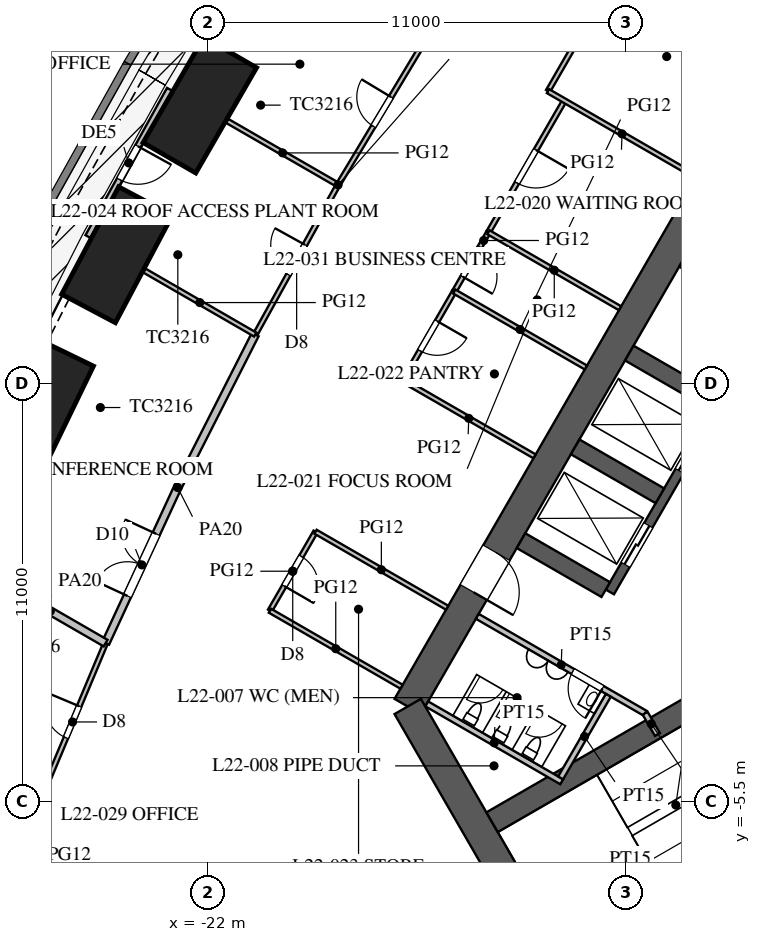
"""IFC4 building model, lengths in metres.
Left out: names, types, materials, properties, quantities, classifications, styles, units other than length and angle.
Written with IfcOpenShell. Run it as: python <this file> out.ifc"""

import sys

from ifc_helpers import new_model, si_unit, direction, frame, frame_2d, origin, origin_2d, place, context, subcontext, project, spatial, rectangle, extrude, element, fill, save


model = new_model("IFC4")
c1 = context("Model", 3, precision=1e-05, world=origin(), true_north=direction((0.0, 1.0)))
c2 = subcontext(c1, "Body", "Model", "MODEL_VIEW")
j1 = project(units=[si_unit("LENGTHUNIT", "METRE"), si_unit("PLANEANGLEUNIT", "RADIAN")], contexts=[c1])
p1 = place(None, origin())
s1 = spatial("IfcSite", under=j1, at=p1, CompositionType="ELEMENT")
p2 = place(p1, origin())
s2 = spatial("IfcBuilding", under=s1, at=p2, CompositionType="ELEMENT")
p3 = place(p2, frame((0.0, 0.0, 98.1)))
s3 = spatial("IfcBuildingStorey", under=s2, at=p3, CompositionType="ELEMENT", Elevation=98.1)
for number, where, z_axis, x_axis in (
    (1, (-22.213, 12.825, 0.0), (0.0, 0.0, 1.0), (-0.5, -0.866, 0.0)),
    (2, (-24.393, 8.887, 0.0), (0.0, 0.0, 1.0), (-0.468, -0.883, 0.0)),
    (3, (-26.43, 4.867, 0.0), (0.0, 0.0, 1.0), (-0.436, -0.9, 0.0)),
):
    element("IfcColumn", number, at=place(p3, frame(where, z_axis=z_axis, x_axis=x_axis)), inside=s3, PredefinedType="COLUMN", context=c2, shape_type="SweptSolid", body=[
        extrude(rectangle(XDim=3.2, YDim=1.6, at=origin_2d()), origin(), (0.0, 0.0, 1.0), 5.0),
    ])
p4 = place(p3, frame((-5.773, 16.0, 0.0), z_axis=(0.0, 0.0, 1.0), x_axis=(-0.500002442456, -0.866023993627, 0.0)))
e4 = element("IfcWall", 4, at=p4, inside=s3, PredefinedType="SHEAR", context=c2, shape_type="SweptSolid", body=[
    extrude(rectangle(XDim=21.939, YDim=0.8, at=frame_2d((10.97, 0.0))), origin(), (0.0, 0.0, 1.0), 5.0),
])
p5 = place(p4, frame((17.27, 0.0, 0.0)))
e5 = element("IfcOpeningElement", 5, at=p5, cuts=e4, PredefinedType="OPENING", context=c2, shape_type="SweptSolid", body=[
    extrude(rectangle(XDim=1.2, YDim=2.1, at=frame_2d((0.6, 1.05))), frame((0.0, 0.41, 0.0), z_axis=(0.0, -1.0, 0.0), x_axis=(1.0, 0.0, 0.0)), (0.0, 0.0, 1.0), 0.82),
])
p6 = place(p4, frame((3.47, 0.0, 0.0)))
e6 = element("IfcOpeningElement", 6, at=p6, cuts=e4, PredefinedType="OPENING", context=c2, shape_type="SweptSolid", body=[
    extrude(rectangle(XDim=1.2, YDim=2.1, at=frame_2d((0.6, 1.05))), frame((0.0, 0.41, 0.0), z_axis=(0.0, -1.0, 0.0), x_axis=(1.0, 0.0, 0.0)), (0.0, 0.0, 1.0), 0.82),
])
p7 = place(p3, frame((-16.743, -3.0, 0.0), z_axis=(0.0, 0.0, 1.0), x_axis=(0.499995765644, -0.866027848477, 0.0)))
e7 = element("IfcWall", 7, at=p7, inside=s3, PredefinedType="SHEAR", context=c2, shape_type="SweptSolid", body=[
    extrude(rectangle(XDim=11.547, YDim=0.8, at=frame_2d((5.773, 0.0))), origin(), (0.0, 0.0, 1.0), 5.0),
])
p8 = place(p3, frame((-5.724, 9.886, 0.0), z_axis=(0.0, 0.0, 1.0), x_axis=(-0.500001763848, -0.866024385424, 0.0)))
e8 = element("IfcWall", 8, at=p8, inside=s3, PredefinedType="SHEAR", context=c2, shape_type="SweptSolid", body=[
    extrude(rectangle(XDim=11.4, YDim=0.25, at=frame_2d((5.7, 0.0))), origin(), (0.0, 0.0, 1.0), 5.0),
])
p9 = place(p8, frame((6.525, 0.0, 0.0)))
e9 = element("IfcOpeningElement", 9, at=p9, cuts=e8, PredefinedType="OPENING", context=c2, shape_type="SweptSolid", body=[
    extrude(rectangle(XDim=1.2, YDim=2.2, at=frame_2d((0.6, 1.1))), frame((0.0, 0.135, 0.0), z_axis=(0.0, -1.0, 0.0), x_axis=(1.0, 0.0, 0.0)), (0.0, 0.0, 1.0), 0.27),
])
p10 = place(p8, frame((9.375, 0.0, 0.0)))
e10 = element("IfcOpeningElement", 10, at=p10, cuts=e8, PredefinedType="OPENING", context=c2, shape_type="SweptSolid", body=[
    extrude(rectangle(XDim=1.2, YDim=2.2, at=frame_2d((0.6, 1.1))), frame((0.0, 0.135, 0.0), z_axis=(0.0, -1.0, 0.0), x_axis=(1.0, 0.0, 0.0)), (0.0, 0.0, 1.0), 0.27),
])
for number, where, z_axis, x_axis in (
    (11, (-7.257, 7.481, 0.0), (0.0, 0.0, 1.0), (-0.866, 0.5, 0.0)),
    (12, (-8.682, 5.012, 0.0), (0.0, 0.0, 1.0), (-0.866, 0.5, 0.0)),
    (13, (-10.107, 2.544, 0.0), (0.0, 0.0, 1.0), (-0.866, 0.5, 0.0)),
    (14, (-11.532, 0.076, 0.0), (0.0, 0.0, 1.0), (-0.866, 0.5, 0.0)),
):
    element("IfcWall", number, at=place(p3, frame(where, z_axis=z_axis, x_axis=x_axis)), inside=s3, PredefinedType="SHEAR", context=c2, shape_type="SweptSolid", body=[
        extrude(rectangle(XDim=2.575, YDim=0.45, at=frame_2d((1.288, 0.0))), origin(), (0.0, 0.0, 1.0), 5.0),
    ])
for number, where, z_axis, x_axis in (
    (15, (-6.663, -1.509, 0.0), (0.0, 0.0, 1.0), (-0.866, -0.5, 0.0)),
    (16, (-4.638, -5.016, 0.0), (0.0, 0.0, 1.0), (-0.866, -0.5, 0.0)),
):
    element("IfcWall", number, at=place(p3, frame(where, z_axis=z_axis, x_axis=x_axis)), inside=s3, PredefinedType="SHEAR", context=c2, shape_type="SweptSolid", body=[
        extrude(rectangle(XDim=9.075, YDim=0.6, at=frame_2d((4.538, 0.0))), origin(), (0.0, 0.0, 1.0), 5.0),
    ])
p11 = place(p3, frame((-21.616, 17.676, 0.0), z_axis=(0.0, 0.0, 1.0), x_axis=(-0.51252396108, -0.858672923364, 0.0)))
e17 = element("IfcWall", 17, at=p11, inside=s3, PredefinedType="PARAPET", context=c2, shape_type="SweptSolid", body=[
    extrude(rectangle(XDim=4.5, YDim=0.25, at=frame_2d((2.25, 0.0))), origin(), (0.0, 0.0, 1.0), 1.1),
])
p12 = place(p3, frame((-23.923, 13.812, 0.0), z_axis=(0.0, 0.0, 1.0), x_axis=(-0.487373854787, -0.873193406795, 0.0)))
e18 = element("IfcWall", 18, at=p12, inside=s3, PredefinedType="PARAPET", context=c2, shape_type="SweptSolid", body=[
    extrude(rectangle(XDim=4.5, YDim=0.25, at=frame_2d((2.25, 0.0))), origin(), (0.0, 0.0, 1.0), 1.1),
])
p13 = place(p3, frame((-26.116, 9.882, 0.0), z_axis=(0.0, 0.0, 1.0), x_axis=(-0.461852697957, -0.886956642339, 0.0)))
e19 = element("IfcWall", 19, at=p13, inside=s3, PredefinedType="PARAPET", context=c2, shape_type="SweptSolid", body=[
    extrude(rectangle(XDim=4.504, YDim=0.25, at=frame_2d((2.252, 0.0))), origin(), (0.0, 0.0, 1.0), 1.1),
])
p14 = place(p3, frame((-23.01, 13.243, 0.0), z_axis=(0.0, 0.0, 1.0), x_axis=(-0.48433245205, -0.874884035682, 0.0)))
e20 = element("IfcWall", 20, at=p14, inside=s3, PredefinedType="SOLIDWALL", context=c2, shape_type="SweptSolid", body=[
    extrude(rectangle(XDim=4.431, YDim=0.15, at=frame_2d((2.215, 0.0))), origin(), (0.0, 0.0, 1.0), 4.98),
])
p15 = place(p14, frame((1.715, 0.0, 0.0)))
e21 = element("IfcOpeningElement", 21, at=p15, cuts=e20, PredefinedType="OPENING", context=c2, shape_type="SweptSolid", body=[
    extrude(rectangle(XDim=1.0, YDim=2.1, at=frame_2d((0.5, 1.05))), frame((0.0, 0.085, 0.0), z_axis=(0.0, -1.0, 0.0), x_axis=(1.0, 0.0, 0.0)), (0.0, 0.0, 1.0), 0.17),
])
p16 = place(p3, frame((-10.495, -3.178, 0.0), z_axis=(0.0, 0.0, 1.0), x_axis=(-0.86602216432, 0.500005610874, 0.0)))
e22 = element("IfcWall", 22, at=p16, inside=s3, PredefinedType="PARTITIONING", context=c2, shape_type="SweptSolid", body=[
    extrude(rectangle(XDim=5.1, YDim=0.15, at=frame_2d((2.55, 0.0))), origin(), (0.0, 0.0, 1.0), 4.8),
])
p17 = place(p16, frame((1.3, 0.0, 0.0)))
e23 = element("IfcOpeningElement", 23, at=p17, cuts=e22, PredefinedType="OPENING", context=c2, shape_type="SweptSolid", body=[
    extrude(rectangle(XDim=0.9, YDim=2.1, at=frame_2d((0.45, 1.05))), frame((0.0, 0.085, 0.0), z_axis=(0.0, -1.0, 0.0), x_axis=(1.0, 0.0, 0.0)), (0.0, 0.0, 1.0), 0.17),
])
p18 = place(p3, frame((-10.495, -3.178, 0.0), z_axis=(0.0, 0.0, 1.0), x_axis=(0.499842556608, -0.866116284689, 0.0)))
e24 = element("IfcWall", 24, at=p18, inside=s3, PredefinedType="PARTITIONING", context=c2, shape_type="SweptSolid", body=[
    extrude(rectangle(XDim=0.645, YDim=0.15, at=frame_2d((0.323, 0.0))), origin(), (0.0, 0.0, 1.0), 4.8),
])
p19 = place(p3, frame((-12.691, -4.982, 0.0), z_axis=(0.0, 0.0, 1.0), x_axis=(-0.8660249478, 0.500000789788, 0.0)))
e25 = element("IfcWall", 25, at=p19, inside=s3, PredefinedType="PARTITIONING", context=c2, shape_type="SweptSolid", body=[
    extrude(rectangle(XDim=4.1, YDim=0.15, at=frame_2d((2.05, 0.0))), origin(), (0.0, 0.0, 1.0), 4.8),
])
p20 = place(p3, frame((-11.464, -2.706, 0.0), z_axis=(0.0, 0.0, 1.0), x_axis=(-0.50001992892, -0.866013897511, 0.0)))
e26 = element("IfcWall", 26, at=p20, inside=s3, PredefinedType="PARTITIONING", context=c2, shape_type="SweptSolid", body=[
    extrude(rectangle(XDim=2.51, YDim=0.15, at=frame_2d((1.255, 0.0))), origin(), (0.0, 0.0, 1.0), 4.8),
])
p21 = place(p3, frame((-15.519, 7.921, 0.0), z_axis=(0.0, 0.0, 1.0), x_axis=(-0.50000943426, -0.866019956843, 0.0)))
e27 = element("IfcWall", 27, at=p21, inside=s3, PredefinedType="PARTITIONING", context=c2, shape_type="SweptSolid", body=[
    extrude(rectangle(XDim=2.7, YDim=0.12, at=frame_2d((1.35, 0.0))), origin(), (0.0, 0.0, 1.0), 3.6),
])
p22 = place(p21, frame((0.9, 0.0, 0.0)))
e28 = element("IfcOpeningElement", 28, at=p22, cuts=e27, PredefinedType="OPENING", context=c2, shape_type="SweptSolid", body=[
    extrude(rectangle(XDim=0.9, YDim=2.1, at=frame_2d((0.45, 1.05))), frame((0.0, 0.07, 0.0), z_axis=(0.0, -1.0, 0.0), x_axis=(1.0, 0.0, 0.0)), (0.0, 0.0, 1.0), 0.14),
])
p23 = place(p3, frame((-19.169, 1.599, 0.0), z_axis=(0.0, 0.0, 1.0), x_axis=(-0.499957262057, -0.866050077142, 0.0)))
e29 = element("IfcWall", 29, at=p23, inside=s3, PredefinedType="PARTITIONING", context=c2, shape_type="SweptSolid", body=[
    extrude(rectangle(XDim=2.4, YDim=0.12, at=frame_2d((1.2, 0.0))), origin(), (0.0, 0.0, 1.0), 3.6),
])
p24 = place(p23, frame((0.75, 0.0, 0.0)))
e30 = element("IfcOpeningElement", 30, at=p24, cuts=e29, PredefinedType="OPENING", context=c2, shape_type="SweptSolid", body=[
    extrude(rectangle(XDim=0.9, YDim=2.1, at=frame_2d((0.45, 1.05))), frame((0.0, 0.07, 0.0), z_axis=(0.0, -1.0, 0.0), x_axis=(1.0, 0.0, 0.0)), (0.0, 0.0, 1.0), 0.14),
])
p25 = place(p3, frame((-14.619, 9.479, 0.0), z_axis=(0.0, 0.0, 1.0), x_axis=(-0.499961193289, -0.866047807691, 0.0)))
e31 = element("IfcWall", 31, at=p25, inside=s3, PredefinedType="PARTITIONING", context=c2, shape_type="SweptSolid", body=[
    extrude(rectangle(XDim=1.8, YDim=0.12, at=frame_2d((0.9, 0.0))), origin(), (0.0, 0.0, 1.0), 3.6),
])
p26 = place(p25, frame((0.45, 0.0, 0.0)))
e32 = element("IfcOpeningElement", 32, at=p26, cuts=e31, PredefinedType="OPENING", context=c2, shape_type="SweptSolid", body=[
    extrude(rectangle(XDim=0.9, YDim=2.1, at=frame_2d((0.45, 1.05))), frame((0.0, 0.07, 0.0), z_axis=(0.0, -1.0, 0.0), x_axis=(1.0, 0.0, 0.0)), (0.0, 0.0, 1.0), 0.14),
])
p27 = place(p3, frame((-12.619, 12.944, 0.0), z_axis=(0.0, 0.0, 1.0), x_axis=(-0.49999894854, -0.866026010844, 0.0)))
e33 = element("IfcWall", 33, at=p27, inside=s3, PredefinedType="PARTITIONING", context=c2, shape_type="SweptSolid", body=[
    extrude(rectangle(XDim=4.0, YDim=0.12, at=frame_2d((2.0, 0.0))), origin(), (0.0, 0.0, 1.0), 3.6),
])
p28 = place(p27, frame((1.5, 0.0, 0.0)))
e34 = element("IfcOpeningElement", 34, at=p28, cuts=e33, PredefinedType="OPENING", context=c2, shape_type="SweptSolid", body=[
    extrude(rectangle(XDim=1.0, YDim=2.1, at=frame_2d((0.5, 1.05))), frame((0.0, 0.07, 0.0), z_axis=(0.0, -1.0, 0.0), x_axis=(1.0, 0.0, 0.0)), (0.0, 0.0, 1.0), 0.14),
])
p29 = place(p3, frame((-10.702, 17.264, 0.0), z_axis=(0.0, 0.0, 1.0), x_axis=(-0.499977259774, -0.866038532462, 0.0)))
e35 = element("IfcWall", 35, at=p29, inside=s3, PredefinedType="PARTITIONING", context=c2, shape_type="SweptSolid", body=[
    extrude(rectangle(XDim=4.7, YDim=0.12, at=frame_2d((2.35, 0.0))), origin(), (0.0, 0.0, 1.0), 3.6),
])
p30 = place(p29, frame((1.45, 0.0, 0.0)))
e36 = element("IfcOpeningElement", 36, at=p30, cuts=e35, PredefinedType="OPENING", context=c2, shape_type="SweptSolid", body=[
    extrude(rectangle(XDim=1.8, YDim=2.1, at=frame_2d((0.9, 1.05))), frame((0.0, 0.07, 0.0), z_axis=(0.0, -1.0, 0.0), x_axis=(1.0, 0.0, 0.0)), (0.0, 0.0, 1.0), 0.14),
])
for number, where, z_axis, x_axis in (
    (37, (-12.055, 5.921, 0.0), (0.0, 0.0, 1.0), (-0.866, 0.5, 0.0)),
    (38, (-16.905, -2.48, 0.0), (0.0, 0.0, 1.0), (-0.866, 0.5, 0.0)),
    (39, (-13.405, 3.582, 0.0), (0.0, 0.0, 1.0), (-0.866, 0.5, 0.0)),
    (40, (-15.705, -0.401, 0.0), (0.0, 0.0, 1.0), (-0.866, 0.5, 0.0)),
    (41, (-11.155, 7.479, 0.0), (0.0, 0.0, 1.0), (-0.866, 0.5, 0.0)),
):
    element("IfcWall", number, at=place(p3, frame(where, z_axis=z_axis, x_axis=x_axis)), inside=s3, PredefinedType="PARTITIONING", context=c2, shape_type="SweptSolid", body=[
        extrude(rectangle(XDim=4.0, YDim=0.12, at=frame_2d((2.0, 0.0))), origin(), (0.0, 0.0, 1.0), 3.6),
    ])
p31 = place(p3, frame((-9.155, 10.944, 0.0), z_axis=(0.0, 0.0, 1.0), x_axis=(-0.866017533419, 0.500013631625, 0.0)))
e42 = element("IfcWall", 42, at=p31, inside=s3, PredefinedType="PARTITIONING", context=c2, shape_type="SweptSolid", body=[
    extrude(rectangle(XDim=4.5, YDim=0.12, at=frame_2d((2.25, 0.0))), origin(), (0.0, 0.0, 1.0), 3.6),
])
p32 = place(p3, frame((-18.576, 10.725, 0.0), z_axis=(0.0, 0.0, 1.0), x_axis=(-0.484292898211, -0.874905931368, 0.0)))
e43 = element("IfcWall", 43, at=p32, inside=s3, PredefinedType="PARTITIONING", context=c2, shape_type="SweptSolid", body=[
    extrude(rectangle(XDim=4.501, YDim=0.12, at=frame_2d((2.25, 0.0))), origin(), (0.0, 0.0, 1.0), 3.6),
])
p33 = place(p32, frame((1.8, 0.0, 0.0)))
e44 = element("IfcOpeningElement", 44, at=p33, cuts=e43, PredefinedType="OPENING", context=c2, shape_type="SweptSolid", body=[
    extrude(rectangle(XDim=0.9, YDim=2.1, at=frame_2d((0.45, 1.05))), frame((0.0, 0.07, 0.0), z_axis=(0.0, -1.0, 0.0), x_axis=(1.0, 0.0, 0.0)), (0.0, 0.0, 1.0), 0.14),
])
p34 = place(p3, frame((-24.692, -1.333, 0.0), z_axis=(0.0, 0.0, 1.0), x_axis=(-0.386762112496, -0.922179520667, 0.0)))
e45 = element("IfcWall", 45, at=p34, inside=s3, PredefinedType="PARTITIONING", context=c2, shape_type="SweptSolid", body=[
    extrude(rectangle(XDim=4.536, YDim=0.12, at=frame_2d((2.268, 0.0))), origin(), (0.0, 0.0, 1.0), 3.6),
])
p35 = place(p34, frame((1.8, 0.0, 0.0)))
e46 = element("IfcOpeningElement", 46, at=p35, cuts=e45, PredefinedType="OPENING", context=c2, shape_type="SweptSolid", body=[
    extrude(rectangle(XDim=0.9, YDim=2.1, at=frame_2d((0.45, 1.05))), frame((0.0, 0.07, 0.0), z_axis=(0.0, -1.0, 0.0), x_axis=(1.0, 0.0, 0.0)), (0.0, 0.0, 1.0), 0.14),
])
p36 = place(p3, frame((-20.756, 6.787, 0.0), z_axis=(0.0, 0.0, 1.0), x_axis=(-0.452471679136, -0.891778772779, 0.0)))
e47 = element("IfcWall", 47, at=p36, inside=s3, PredefinedType="PARTITIONING", context=c2, shape_type="SweptSolid", body=[
    extrude(rectangle(XDim=4.507, YDim=0.2, at=frame_2d((2.253, 0.0))), origin(), (0.0, 0.0, 1.0), 3.6),
])
p37 = place(p3, frame((-22.795, 2.768, 0.0), z_axis=(0.0, 0.0, 1.0), x_axis=(-0.41992827805, -0.90755729367, 0.0)))
e48 = element("IfcWall", 48, at=p37, inside=s3, PredefinedType="PARTITIONING", context=c2, shape_type="SweptSolid", body=[
    extrude(rectangle(XDim=4.519, YDim=0.2, at=frame_2d((2.259, 0.0))), origin(), (0.0, 0.0, 1.0), 3.6),
])
p38 = place(p37, frame((1.35, 0.0, 0.0)))
e49 = element("IfcOpeningElement", 49, at=p38, cuts=e48, PredefinedType="OPENING", context=c2, shape_type="SweptSolid", body=[
    extrude(rectangle(XDim=1.8, YDim=2.1, at=frame_2d((0.9, 1.05))), frame((0.0, 0.11, 0.0), z_axis=(0.0, -1.0, 0.0), x_axis=(1.0, 0.0, 0.0)), (0.0, 0.0, 1.0), 0.22),
])
p39 = place(p3, frame((-16.256, 14.581, 0.0), z_axis=(0.0, 0.0, 1.0), x_axis=(-0.515548366618, -0.856860479703, 0.0)))
e50 = element("IfcWall", 50, at=p39, inside=s3, PredefinedType="PARTITIONING", context=c2, shape_type="SweptSolid", body=[
    extrude(rectangle(XDim=4.501, YDim=0.12, at=frame_2d((2.25, 0.0))), origin(), (0.0, 0.0, 1.0), 3.6),
])
p40 = place(p39, frame((1.8, 0.0, 0.0)))
e51 = element("IfcOpeningElement", 51, at=p40, cuts=e50, PredefinedType="OPENING", context=c2, shape_type="SweptSolid", body=[
    extrude(rectangle(XDim=0.9, YDim=2.1, at=frame_2d((0.45, 1.05))), frame((0.0, 0.07, 0.0), z_axis=(0.0, -1.0, 0.0), x_axis=(1.0, 0.0, 0.0)), (0.0, 0.0, 1.0), 0.14),
])
p41 = place(p3, frame((-18.576, 10.725, 0.0), z_axis=(0.0, 0.0, 1.0), x_axis=(-0.866014270972, 0.500019282102, 0.0)))
e52 = element("IfcWall", 52, at=p41, inside=s3, PredefinedType="PARTITIONING", context=c2, shape_type="SweptSolid", body=[
    extrude(rectangle(XDim=3.37, YDim=0.12, at=frame_2d((1.685, 0.0))), origin(), (0.0, 0.0, 1.0), 3.2),
])
p42 = place(p3, frame((-24.692, -1.333, 0.0), z_axis=(0.0, 0.0, 1.0), x_axis=(-0.866025882247, 0.499999171277, 0.0)))
e53 = element("IfcWall", 53, at=p42, inside=s3, PredefinedType="PARTITIONING", context=c2, shape_type="SweptSolid", body=[
    extrude(rectangle(XDim=3.36, YDim=0.2, at=frame_2d((1.68, 0.0))), origin(), (0.0, 0.0, 1.0), 3.0),
])
p43 = place(p3, frame((-20.756, 6.787, 0.0), z_axis=(0.0, 0.0, 1.0), x_axis=(-0.866022675988, 0.500004724652, 0.0)))
e54 = element("IfcWall", 54, at=p43, inside=s3, PredefinedType="PARTITIONING", context=c2, shape_type="SweptSolid", body=[
    extrude(rectangle(XDim=3.369, YDim=0.12, at=frame_2d((1.685, 0.0))), origin(), (0.0, 0.0, 1.0), 3.2),
])
p44 = place(p15, origin())
e55 = element("IfcDoor", 55, at=p44, inside=s3, OperationType="SINGLE_SWING_LEFT", PredefinedType="DOOR", context=c2, shape_type="SweptSolid", body=[
    extrude(rectangle(XDim=1.0, YDim=2.1, at=frame_2d((0.5, 1.05))), frame((0.0, 0.025, 0.0), z_axis=(0.0, -1.0, 0.0), x_axis=(1.0, 0.0, 0.0)), (0.0, 0.0, 1.0), 0.05),
])
fill(e21, e55)
p45 = place(p17, origin())
e56 = element("IfcDoor", 56, at=p45, inside=s3, OperationType="SINGLE_SWING_LEFT", PredefinedType="DOOR", context=c2, shape_type="SweptSolid", body=[
    extrude(rectangle(XDim=0.9, YDim=2.1, at=frame_2d((0.45, 1.05))), frame((0.0, 0.025, 0.0), z_axis=(0.0, -1.0, 0.0), x_axis=(1.0, 0.0, 0.0)), (0.0, 0.0, 1.0), 0.05),
])
fill(e23, e56)
p46 = place(p5, origin())
e57 = element("IfcDoor", 57, at=p46, inside=s3, OperationType="SINGLE_SWING_RIGHT", PredefinedType="DOOR", context=c2, shape_type="SweptSolid", body=[
    extrude(rectangle(XDim=1.2, YDim=2.1, at=frame_2d((0.6, 1.05))), frame((0.0, 0.025, 0.0), z_axis=(0.0, -1.0, 0.0), x_axis=(1.0, 0.0, 0.0)), (0.0, 0.0, 1.0), 0.05),
])
fill(e5, e57)
p47 = place(p28, origin())
e58 = element("IfcDoor", 58, at=p47, inside=s3, OperationType="SINGLE_SWING_LEFT", PredefinedType="DOOR", context=c2, shape_type="SweptSolid", body=[
    extrude(rectangle(XDim=1.0, YDim=2.1, at=frame_2d((0.5, 1.05))), frame((0.0, 0.025, 0.0), z_axis=(0.0, -1.0, 0.0), x_axis=(1.0, 0.0, 0.0)), (0.0, 0.0, 1.0), 0.05),
])
fill(e34, e58)
p48 = place(p26, origin())
e59 = element("IfcDoor", 59, at=p48, inside=s3, OperationType="SINGLE_SWING_RIGHT", PredefinedType="DOOR", context=c2, shape_type="SweptSolid", body=[
    extrude(rectangle(XDim=0.9, YDim=2.1, at=frame_2d((0.45, 1.05))), frame((0.0, 0.025, 0.0), z_axis=(0.0, -1.0, 0.0), x_axis=(1.0, 0.0, 0.0)), (0.0, 0.0, 1.0), 0.05),
])
fill(e32, e59)
p49 = place(p22, origin())
e60 = element("IfcDoor", 60, at=p49, inside=s3, OperationType="SINGLE_SWING_LEFT", PredefinedType="DOOR", context=c2, shape_type="SweptSolid", body=[
    extrude(rectangle(XDim=0.9, YDim=2.1, at=frame_2d((0.45, 1.05))), frame((0.0, 0.025, 0.0), z_axis=(0.0, -1.0, 0.0), x_axis=(1.0, 0.0, 0.0)), (0.0, 0.0, 1.0), 0.05),
])
fill(e28, e60)
p50 = place(p24, origin())
e61 = element("IfcDoor", 61, at=p50, inside=s3, OperationType="SINGLE_SWING_RIGHT", PredefinedType="DOOR", context=c2, shape_type="SweptSolid", body=[
    extrude(rectangle(XDim=0.9, YDim=2.1, at=frame_2d((0.45, 1.05))), frame((0.0, 0.025, 0.0), z_axis=(0.0, -1.0, 0.0), x_axis=(1.0, 0.0, 0.0)), (0.0, 0.0, 1.0), 0.05),
])
fill(e30, e61)
p51 = place(p33, frame((0.9, 0.0, 0.0), z_axis=(0.0, 0.0, 1.0), x_axis=(-1.0, 0.0, 0.0)))
e62 = element("IfcDoor", 62, at=p51, inside=s3, OperationType="SINGLE_SWING_RIGHT", PredefinedType="DOOR", context=c2, shape_type="SweptSolid", body=[
    extrude(rectangle(XDim=0.9, YDim=2.1, at=frame_2d((0.45, 1.05))), frame((0.0, 0.025, 0.0), z_axis=(0.0, -1.0, 0.0), x_axis=(1.0, 0.0, 0.0)), (0.0, 0.0, 1.0), 0.05),
])
fill(e44, e62)
p52 = place(p38, frame((1.8, 0.0, 0.0), z_axis=(0.0, 0.0, 1.0), x_axis=(-1.0, 0.0, 0.0)))
e63 = element("IfcDoor", 63, at=p52, inside=s3, OperationType="DOUBLE_DOOR_SINGLE_SWING", PredefinedType="DOOR", context=c2, shape_type="SweptSolid", body=[
    extrude(rectangle(XDim=1.8, YDim=2.1, at=frame_2d((0.9, 1.05))), frame((0.0, 0.025, 0.0), z_axis=(0.0, -1.0, 0.0), x_axis=(1.0, 0.0, 0.0)), (0.0, 0.0, 1.0), 0.05),
])
fill(e49, e63)
p53 = place(p40, frame((0.9, 0.0, 0.0), z_axis=(0.0, 0.0, 1.0), x_axis=(-1.0, 0.0, 0.0)))
e64 = element("IfcDoor", 64, at=p53, inside=s3, OperationType="SINGLE_SWING_RIGHT", PredefinedType="DOOR", context=c2, shape_type="SweptSolid", body=[
    extrude(rectangle(XDim=0.9, YDim=2.1, at=frame_2d((0.45, 1.05))), frame((0.0, 0.025, 0.0), z_axis=(0.0, -1.0, 0.0), x_axis=(1.0, 0.0, 0.0)), (0.0, 0.0, 1.0), 0.05),
])
fill(e51, e64)
p54 = place(p35, frame((0.9, 0.0, 0.0), z_axis=(0.0, 0.0, 1.0), x_axis=(-1.0, 0.0, 0.0)))
e65 = element("IfcDoor", 65, at=p54, inside=s3, OperationType="SINGLE_SWING_RIGHT", PredefinedType="DOOR", context=c2, shape_type="SweptSolid", body=[
    extrude(rectangle(XDim=0.9, YDim=2.1, at=frame_2d((0.45, 1.05))), frame((0.0, 0.025, 0.0), z_axis=(0.0, -1.0, 0.0), x_axis=(1.0, 0.0, 0.0)), (0.0, 0.0, 1.0), 0.05),
])
fill(e46, e65)
p55 = place(p9, origin())
e66 = element("IfcDoor", 66, at=p55, inside=s3, OperationType="DOUBLE_DOOR_SLIDING", PredefinedType="DOOR", context=c2, shape_type="SweptSolid", body=[
    extrude(rectangle(XDim=1.2, YDim=2.2, at=frame_2d((0.6, 1.1))), frame((0.0, 0.025, 0.0), z_axis=(0.0, -1.0, 0.0), x_axis=(1.0, 0.0, 0.0)), (0.0, 0.0, 1.0), 0.05),
])
fill(e9, e66)
p56 = place(p10, origin())
e67 = element("IfcDoor", 67, at=p56, inside=s3, OperationType="DOUBLE_DOOR_SLIDING", PredefinedType="DOOR", context=c2, shape_type="SweptSolid", body=[
    extrude(rectangle(XDim=1.2, YDim=2.2, at=frame_2d((0.6, 1.1))), frame((0.0, 0.025, 0.0), z_axis=(0.0, -1.0, 0.0), x_axis=(1.0, 0.0, 0.0)), (0.0, 0.0, 1.0), 0.05),
])
fill(e10, e67)
save(model, sys.argv[1])
